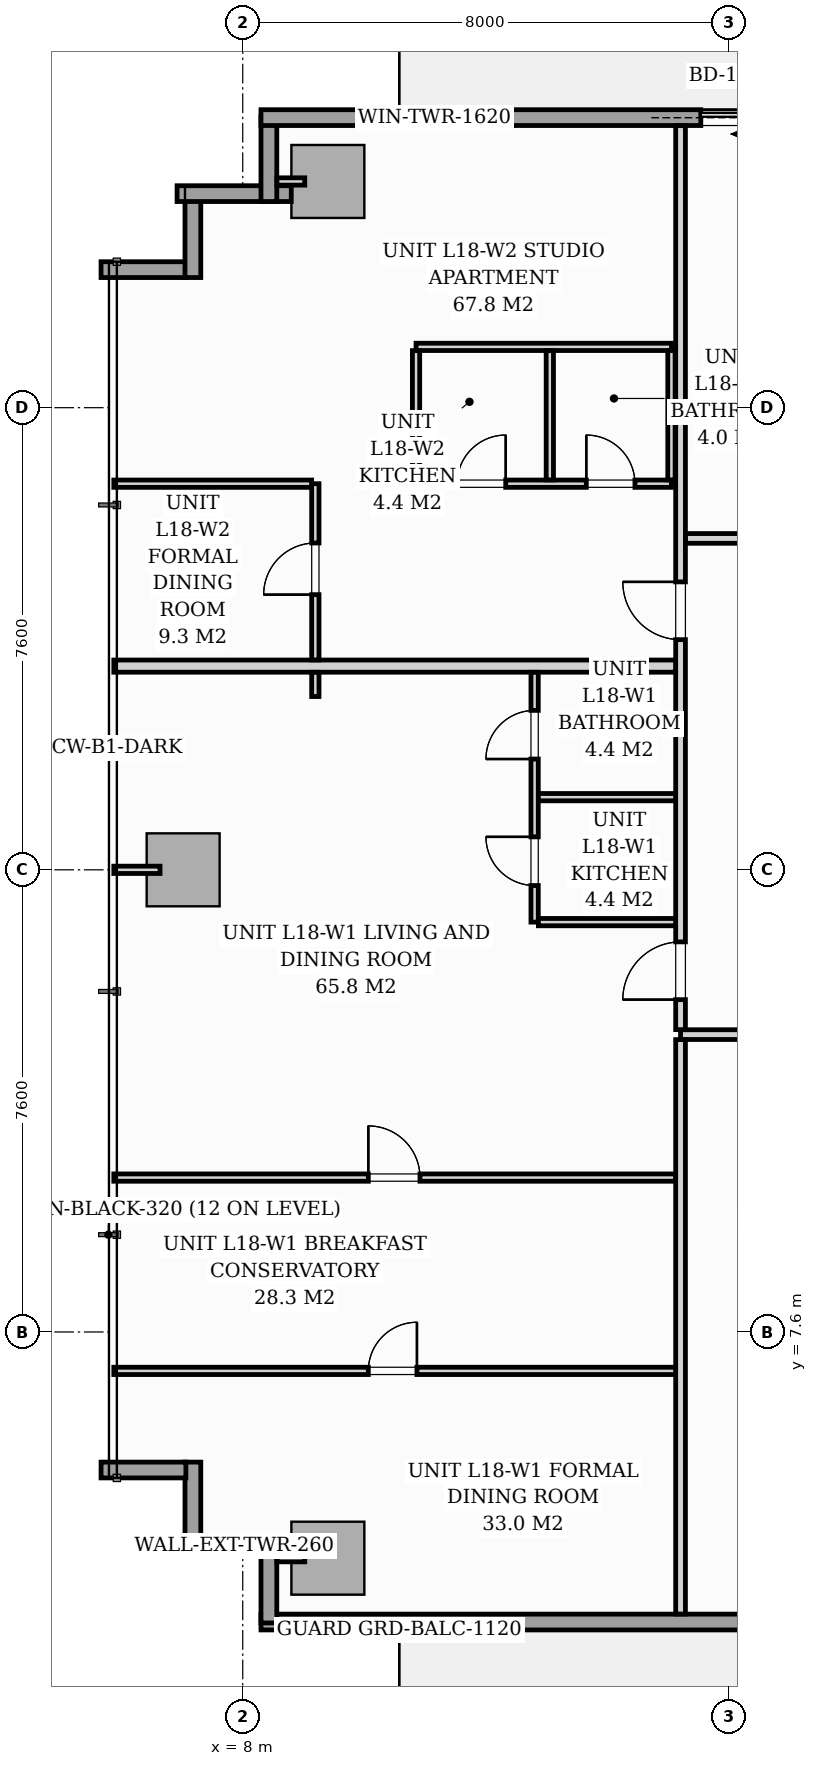
"""IFC4 building model, lengths in metres.
Left out: names, types, materials, properties, quantities, classifications, styles, units other than length and angle.
Written with IfcOpenShell. Run it as: python <this file> out.ifc"""

import sys

from ifc_helpers import new_model, si_unit, direction, frame, frame_2d, origin, origin_2d, place, context, subcontext, project, spatial, rectangle, extrude, source, transform, mapped, element, fill, save


model = new_model("IFC4")
c1 = context("Model", 3, precision=1e-05, world=origin(), true_north=direction((0.0, 1.0)))
c2 = subcontext(c1, "Body", "Model", "MODEL_VIEW")
j1 = project(units=[si_unit("LENGTHUNIT", "METRE"), si_unit("PLANEANGLEUNIT", "RADIAN")], contexts=[c1])
p1 = place(None, origin())
s1 = spatial("IfcSite", under=j1, at=p1, CompositionType="ELEMENT")
p2 = place(p1, origin())
s2 = spatial("IfcBuilding", under=s1, at=p2, CompositionType="ELEMENT")
p3 = place(p2, frame((0.0, 0.0, 64.6)))
s3 = spatial("IfcBuildingStorey", under=s2, at=p3, CompositionType="ELEMENT", Elevation=64.6)
m1 = source(origin(), c2, "Body", "SweptSolid", [
    extrude(rectangle(XDim=1.2, YDim=1.2, at=origin_2d()), origin(), (0.0, 0.0, 1.0), 3.194),
])
for number, where, z_axis, x_axis in (
    (1, (9.4, 3.88, 0.002), (0.0, 0.0, 1.0), (1.0, 0.0, 0.0)),
    (2, (9.4, 26.52, 0.002), (0.0, 0.0, 1.0), (1.0, 0.0, 0.0)),
    (3, (7.02, 15.2, 0.002), (0.0, 0.0, 1.0), (1.0, 0.0, 0.0)),
):
    element("IfcColumn", number, at=place(p3, frame(where, z_axis=z_axis, x_axis=x_axis)), inside=s3, PredefinedType="COLUMN", context=c2, shape_type="MappedRepresentation", body=[
        mapped(m1, transform((0.0, 0.0, 0.0), scale=1.0)),
    ])
p4 = place(p3, frame((8.798, 4.08, 0.0), z_axis=(0.0, 0.0, 1.0), x_axis=(-1.0, 0.0, 0.0)))
e4 = element("IfcWall", 4, at=p4, inside=s3, PredefinedType="STANDARD", context=c2, shape_type="SweptSolid", body=[
    extrude(rectangle(XDim=1.878, YDim=0.26, at=frame_2d((0.939, 0.0))), origin(), (0.0, 0.0, 1.0), 2.9),
])
for number, where, z_axis, x_axis in (
    (5, (7.18, 4.065, 0.0), (0.0, 0.0, 1.0), (0.0, 1.0, 0.0)),
    (6, (7.065, 5.33, 0.0), (0.0, 0.0, 1.0), (-1.0, 0.0, 0.0)),
    (7, (5.67, 25.07, 0.0), (0.0, 0.0, 1.0), (1.0, 0.0, 0.0)),
    (8, (7.18, 24.94, 0.0), (0.0, 0.0, 1.0), (0.0, 1.0, 0.0)),
):
    element("IfcWall", number, at=place(p3, frame(where, z_axis=z_axis, x_axis=x_axis)), inside=s3, PredefinedType="STANDARD", context=c2, shape_type="SweptSolid", body=[
        extrude(rectangle(XDim=1.395, YDim=0.26, at=frame_2d((0.698, 0.0))), origin(), (0.0, 0.0, 1.0), 2.9),
    ])
p5 = place(p3, frame((6.92, 26.32, 0.0), z_axis=(0.0, 0.0, 1.0), x_axis=(1.0, 0.0, 0.0)))
e9 = element("IfcWall", 9, at=p5, inside=s3, PredefinedType="STANDARD", context=c2, shape_type="SweptSolid", body=[
    extrude(rectangle(XDim=1.878, YDim=0.26, at=frame_2d((0.939, 0.0))), origin(), (0.0, 0.0, 1.0), 2.9),
])
p6 = place(p3, frame((8.43, 26.19, 0.0), z_axis=(0.0, 0.0, 1.0), x_axis=(0.0, 1.0, 0.0)))
e10 = element("IfcWall", 10, at=p6, inside=s3, PredefinedType="STANDARD", context=c2, shape_type="SweptSolid", body=[
    extrude(rectangle(XDim=1.395, YDim=0.26, at=frame_2d((0.698, 0.0))), origin(), (0.0, 0.0, 1.0), 2.9),
])
p7 = place(p3, frame((8.3, 27.57, 0.0), z_axis=(0.0, 0.0, 1.0), x_axis=(1.0, 0.0, 0.0)))
e11 = element("IfcWall", 11, at=p7, inside=s3, PredefinedType="STANDARD", context=c2, shape_type="SweptSolid", body=[
    extrude(rectangle(XDim=17.15, YDim=0.26, at=frame_2d((8.575, 0.0))), origin(), (0.0, 0.0, 1.0), 2.9),
])
p8 = place(p7, frame((7.233, 0.0, 0.0)))
e12 = element("IfcOpeningElement", 12, at=p8, cuts=e11, PredefinedType="OPENING", context=c2, shape_type="SweptSolid", body=[
    extrude(rectangle(XDim=1.8, YDim=2.06, at=frame_2d((0.9, 1.03))), frame((0.0, 0.14, 0.0), z_axis=(0.0, -1.0, 0.0), x_axis=(1.0, 0.0, 0.0)), (0.0, 0.0, 1.0), 0.28),
])
p9 = place(p7, frame((2.05, 0.0, 0.65)))
e13 = element("IfcOpeningElement", 13, at=p9, cuts=e11, PredefinedType="OPENING", context=c2, shape_type="SweptSolid", body=[
    extrude(rectangle(XDim=1.6, YDim=1.5, at=frame_2d((0.8, 0.75))), frame((0.0, 0.14, 0.0), z_axis=(0.0, -1.0, 0.0), x_axis=(1.0, 0.0, 0.0)), (0.0, 0.0, 1.0), 0.28),
])
p10 = place(p3, frame((25.45, 2.83, 0.0), z_axis=(0.0, 0.0, 1.0), x_axis=(-1.0, 0.0, 0.0)))
e14 = element("IfcWall", 14, at=p10, inside=s3, PredefinedType="STANDARD", context=c2, shape_type="SweptSolid", body=[
    extrude(rectangle(XDim=17.15, YDim=0.26, at=frame_2d((8.575, 0.0))), origin(), (0.0, 0.0, 1.0), 2.9),
])
p11 = place(p10, frame((6.65, 0.0, 0.0)))
e15 = element("IfcOpeningElement", 15, at=p11, cuts=e14, PredefinedType="OPENING", context=c2, shape_type="SweptSolid", body=[
    extrude(rectangle(XDim=1.8, YDim=2.06, at=frame_2d((0.9, 1.03))), frame((0.0, 0.14, 0.0), z_axis=(0.0, -1.0, 0.0), x_axis=(1.0, 0.0, 0.0)), (0.0, 0.0, 1.0), 0.28),
])
p12 = place(p10, frame((0.7, 0.0, 0.65)))
e16 = element("IfcOpeningElement", 16, at=p12, cuts=e14, PredefinedType="OPENING", context=c2, shape_type="SweptSolid", body=[
    extrude(rectangle(XDim=1.6, YDim=1.5, at=frame_2d((0.8, 0.75))), frame((0.0, 0.14, 0.0), z_axis=(0.0, -1.0, 0.0), x_axis=(1.0, 0.0, 0.0)), (0.0, 0.0, 1.0), 0.28),
])
p13 = place(p3, frame((8.43, 2.815, 0.0), z_axis=(0.0, 0.0, 1.0), x_axis=(0.0, 1.0, 0.0)))
e17 = element("IfcWall", 17, at=p13, inside=s3, PredefinedType="STANDARD", context=c2, shape_type="SweptSolid", body=[
    extrude(rectangle(XDim=1.395, YDim=0.26, at=frame_2d((0.698, 0.0))), origin(), (0.0, 0.0, 1.0), 2.9),
])
p14 = place(p3, frame((15.2, 12.49, 0.0), z_axis=(0.0, 0.0, 1.0), x_axis=(1.0, 0.0, 0.0)))
e18 = element("IfcWall", 18, at=p14, inside=s3, PredefinedType="PARTITIONING", context=c2, shape_type="SweptSolid", body=[
    extrude(rectangle(XDim=37.1, YDim=0.16, at=frame_2d((18.55, 0.0))), origin(), (0.0, 0.0, 1.0), 2.9),
])
p15 = place(p14, frame((5.863, 0.0, 0.0)))
e19 = element("IfcOpeningElement", 19, at=p15, cuts=e18, PredefinedType="OPENING", context=c2, shape_type="SweptSolid", body=[
    extrude(rectangle(XDim=0.95, YDim=2.06, at=frame_2d((0.475, 1.03))), frame((0.0, 0.09, 0.0), z_axis=(0.0, -1.0, 0.0), x_axis=(1.0, 0.0, 0.0)), (0.0, 0.0, 1.0), 0.18),
])
p16 = place(p14, frame((18.25, 0.0, 0.0)))
e20 = element("IfcOpeningElement", 20, at=p16, cuts=e18, PredefinedType="OPENING", context=c2, shape_type="SweptSolid", body=[
    extrude(rectangle(XDim=0.95, YDim=2.06, at=frame_2d((0.475, 1.03))), frame((0.0, 0.09, 0.0), z_axis=(0.0, -1.0, 0.0), x_axis=(1.0, 0.0, 0.0)), (0.0, 0.0, 1.0), 0.18),
])
p17 = place(p14, frame((30.63, 0.0, 0.0)))
e21 = element("IfcOpeningElement", 21, at=p17, cuts=e18, PredefinedType="OPENING", context=c2, shape_type="SweptSolid", body=[
    extrude(rectangle(XDim=0.95, YDim=2.06, at=frame_2d((0.475, 1.03))), frame((0.0, 0.09, 0.0), z_axis=(0.0, -1.0, 0.0), x_axis=(1.0, 0.0, 0.0)), (0.0, 0.0, 1.0), 0.18),
])
p18 = place(p3, frame((15.2, 2.962, 0.0), z_axis=(0.0, 0.0, 1.0), x_axis=(0.0, 1.0, 0.0)))
e22 = element("IfcWall", 22, at=p18, inside=s3, PredefinedType="PARTITIONING", context=c2, shape_type="SweptSolid", body=[
    extrude(rectangle(XDim=9.446, YDim=0.16, at=frame_2d((4.723, 0.0))), origin(), (0.0, 0.0, 1.0), 2.9),
])
p19 = place(p3, frame((15.2, 12.572, 0.0), z_axis=(0.0, 0.0, 1.0), x_axis=(0.0, 1.0, 0.0)))
e23 = element("IfcWall", 23, at=p19, inside=s3, PredefinedType="PARTITIONING", context=c2, shape_type="SweptSolid", body=[
    extrude(rectangle(XDim=14.866, YDim=0.16, at=frame_2d((7.433, 0.0))), origin(), (0.0, 0.0, 1.0), 2.9),
])
p20 = place(p19, frame((0.493, 0.0, 0.0)))
e24 = element("IfcOpeningElement", 24, at=p20, cuts=e23, PredefinedType="OPENING", context=c2, shape_type="SweptSolid", body=[
    extrude(rectangle(XDim=0.95, YDim=2.06, at=frame_2d((0.475, 1.03))), frame((0.0, 0.09, 0.0), z_axis=(0.0, -1.0, 0.0), x_axis=(1.0, 0.0, 0.0)), (0.0, 0.0, 1.0), 0.18),
])
p21 = place(p19, frame((6.413, 0.0, 0.0)))
e25 = element("IfcOpeningElement", 25, at=p21, cuts=e23, PredefinedType="OPENING", context=c2, shape_type="SweptSolid", body=[
    extrude(rectangle(XDim=0.95, YDim=2.06, at=frame_2d((0.475, 1.03))), frame((0.0, 0.09, 0.0), z_axis=(0.0, -1.0, 0.0), x_axis=(1.0, 0.0, 0.0)), (0.0, 0.0, 1.0), 0.18),
])
p22 = place(p3, frame((5.88, 18.55, 0.0), z_axis=(0.0, 0.0, 1.0), x_axis=(1.0, 0.0, 0.0)))
e26 = element("IfcWall", 26, at=p22, inside=s3, PredefinedType="PARTITIONING", context=c2, shape_type="SweptSolid", body=[
    extrude(rectangle(XDim=9.238, YDim=0.2, at=frame_2d((4.619, 0.0))), origin(), (0.0, 0.0, 1.0), 2.9),
])
p23 = place(p3, frame((12.8, 14.34, 0.0), z_axis=(0.0, 0.0, 1.0), x_axis=(0.0, 1.0, 0.0)))
e27 = element("IfcWall", 27, at=p23, inside=s3, PredefinedType="PARTITIONING", context=c2, shape_type="SweptSolid", body=[
    extrude(rectangle(XDim=4.108, YDim=0.12, at=frame_2d((2.054, 0.0))), origin(), (0.0, 0.0, 1.0), 2.9),
])
p24 = place(p23, frame((0.602, 0.0, 0.0)))
e28 = element("IfcOpeningElement", 28, at=p24, cuts=e27, PredefinedType="OPENING", context=c2, shape_type="SweptSolid", body=[
    extrude(rectangle(XDim=0.8, YDim=2.0, at=frame_2d((0.4, 1.0))), frame((0.0, 0.07, 0.0), z_axis=(0.0, -1.0, 0.0), x_axis=(1.0, 0.0, 0.0)), (0.0, 0.0, 1.0), 0.14),
])
p25 = place(p23, frame((2.682, 0.0, 0.0)))
e29 = element("IfcOpeningElement", 29, at=p25, cuts=e27, PredefinedType="OPENING", context=c2, shape_type="SweptSolid", body=[
    extrude(rectangle(XDim=0.8, YDim=2.0, at=frame_2d((0.4, 1.0))), frame((0.0, 0.07, 0.0), z_axis=(0.0, -1.0, 0.0), x_axis=(1.0, 0.0, 0.0)), (0.0, 0.0, 1.0), 0.14),
])
for number, where, z_axis, x_axis in (
    (30, (12.862, 16.395, 0.0), (0.0, 0.0, 1.0), (1.0, 0.0, 0.0)),
    (31, (12.862, 14.34, 0.0), (0.0, 0.0, 1.0), (1.0, 0.0, 0.0)),
):
    element("IfcWall", number, at=place(p3, frame(where, z_axis=z_axis, x_axis=x_axis)), inside=s3, PredefinedType="PARTITIONING", context=c2, shape_type="SweptSolid", body=[
        extrude(rectangle(XDim=2.256, YDim=0.12, at=frame_2d((1.128, 0.0))), origin(), (0.0, 0.0, 1.0), 2.9),
    ])
p26 = place(p3, frame((5.88, 6.96, 0.0), z_axis=(0.0, 0.0, 1.0), x_axis=(1.0, 0.0, 0.0)))
e32 = element("IfcWall", 32, at=p26, inside=s3, PredefinedType="PARTITIONING", context=c2, shape_type="SweptSolid", body=[
    extrude(rectangle(XDim=9.238, YDim=0.12, at=frame_2d((4.619, 0.0))), origin(), (0.0, 0.0, 1.0), 2.9),
])
p27 = place(p26, frame((4.185, 0.0, 0.0)))
e33 = element("IfcOpeningElement", 33, at=p27, cuts=e32, PredefinedType="OPENING", context=c2, shape_type="SweptSolid", body=[
    extrude(rectangle(XDim=0.8, YDim=2.0, at=frame_2d((0.4, 1.0))), frame((0.0, 0.07, 0.0), z_axis=(0.0, -1.0, 0.0), x_axis=(1.0, 0.0, 0.0)), (0.0, 0.0, 1.0), 0.14),
])
p28 = place(p3, frame((5.88, 10.139, 0.0), z_axis=(0.0, 0.0, 1.0), x_axis=(1.0, 0.0, 0.0)))
e34 = element("IfcWall", 34, at=p28, inside=s3, PredefinedType="PARTITIONING", context=c2, shape_type="SweptSolid", body=[
    extrude(rectangle(XDim=9.238, YDim=0.12, at=frame_2d((4.619, 0.0))), origin(), (0.0, 0.0, 1.0), 2.9),
])
p29 = place(p28, frame((4.185, 0.0, 0.0)))
e35 = element("IfcOpeningElement", 35, at=p29, cuts=e34, PredefinedType="OPENING", context=c2, shape_type="SweptSolid", body=[
    extrude(rectangle(XDim=0.85, YDim=2.05, at=frame_2d((0.425, 1.025))), frame((0.0, 0.07, 0.0), z_axis=(0.0, -1.0, 0.0), x_axis=(1.0, 0.0, 0.0)), (0.0, 0.0, 1.0), 0.14),
])
p30 = place(p3, frame((10.85, 21.55, 0.0), z_axis=(0.0, 0.0, 1.0), x_axis=(1.0, 0.0, 0.0)))
e36 = element("IfcWall", 36, at=p30, inside=s3, PredefinedType="PARTITIONING", context=c2, shape_type="SweptSolid", body=[
    extrude(rectangle(XDim=4.2, YDim=0.12, at=frame_2d((2.1, 0.0))), origin(), (0.0, 0.0, 1.0), 2.9),
])
p31 = place(p30, frame((0.675, 0.0, 0.0)))
e37 = element("IfcOpeningElement", 37, at=p31, cuts=e36, PredefinedType="OPENING", context=c2, shape_type="SweptSolid", body=[
    extrude(rectangle(XDim=0.8, YDim=2.0, at=frame_2d((0.4, 1.0))), frame((0.0, 0.07, 0.0), z_axis=(0.0, -1.0, 0.0), x_axis=(1.0, 0.0, 0.0)), (0.0, 0.0, 1.0), 0.14),
])
p32 = place(p30, frame((2.8, 0.0, 0.0)))
e38 = element("IfcOpeningElement", 38, at=p32, cuts=e36, PredefinedType="OPENING", context=c2, shape_type="SweptSolid", body=[
    extrude(rectangle(XDim=0.8, YDim=2.02, at=frame_2d((0.4, 1.01))), frame((0.0, 0.07, 0.0), z_axis=(0.0, -1.0, 0.0), x_axis=(1.0, 0.0, 0.0)), (0.0, 0.0, 1.0), 0.14),
])
p33 = place(p3, frame((10.85, 23.8, 0.0), z_axis=(0.0, 0.0, 1.0), x_axis=(1.0, 0.0, 0.0)))
e39 = element("IfcWall", 39, at=p33, inside=s3, PredefinedType="PARTITIONING", context=c2, shape_type="SweptSolid", body=[
    extrude(rectangle(XDim=4.2, YDim=0.12, at=frame_2d((2.1, 0.0))), origin(), (0.0, 0.0, 1.0), 2.9),
])
for number, where, z_axis, x_axis in (
    (40, (10.85, 21.612, 0.0), (0.0, 0.0, 1.0), (0.0, 1.0, 0.0)),
    (41, (13.05, 21.612, 0.0), (0.0, 0.0, 1.0), (0.0, 1.0, 0.0)),
    (42, (15.05, 21.612, 0.0), (0.0, 0.0, 1.0), (0.0, 1.0, 0.0)),
):
    element("IfcWall", number, at=place(p3, frame(where, z_axis=z_axis, x_axis=x_axis)), inside=s3, PredefinedType="PARTITIONING", context=c2, shape_type="SweptSolid", body=[
        extrude(rectangle(XDim=2.126, YDim=0.12, at=frame_2d((1.063, 0.0))), origin(), (0.0, 0.0, 1.0), 2.9),
    ])
p34 = place(p3, frame((9.194, 18.05, 0.0), z_axis=(0.0, 0.0, 1.0), x_axis=(0.0, 1.0, 0.0)))
e43 = element("IfcWall", 43, at=p34, inside=s3, PredefinedType="PARTITIONING", context=c2, shape_type="SweptSolid", body=[
    extrude(rectangle(XDim=0.398, YDim=0.12, at=frame_2d((0.199, 0.0))), origin(), (0.0, 0.0, 1.0), 2.9),
])
p35 = place(p3, frame((9.194, 18.652, 0.0), z_axis=(0.0, 0.0, 1.0), x_axis=(0.0, 1.0, 0.0)))
e44 = element("IfcWall", 44, at=p35, inside=s3, PredefinedType="PARTITIONING", context=c2, shape_type="SweptSolid", body=[
    extrude(rectangle(XDim=2.898, YDim=0.12, at=frame_2d((1.449, 0.0))), origin(), (0.0, 0.0, 1.0), 2.9),
])
p36 = place(p35, frame((1.073, 0.0, 0.0)))
e45 = element("IfcOpeningElement", 45, at=p36, cuts=e44, PredefinedType="OPENING", context=c2, shape_type="SweptSolid", body=[
    extrude(rectangle(XDim=0.85, YDim=2.05, at=frame_2d((0.425, 1.025))), frame((0.0, 0.07, 0.0), z_axis=(0.0, -1.0, 0.0), x_axis=(1.0, 0.0, 0.0)), (0.0, 0.0, 1.0), 0.14),
])
p37 = place(p3, frame((5.88, 21.55, 0.0), z_axis=(0.0, 0.0, 1.0), x_axis=(1.0, 0.0, 0.0)))
e46 = element("IfcWall", 46, at=p37, inside=s3, PredefinedType="PARTITIONING", context=c2, shape_type="SweptSolid", body=[
    extrude(rectangle(XDim=3.252, YDim=0.12, at=frame_2d((1.626, 0.0))), origin(), (0.0, 0.0, 1.0), 2.9),
])
p38 = place(p3, frame((15.282, 20.65, 0.0), z_axis=(0.0, 0.0, 1.0), x_axis=(1.0, 0.0, 0.0)))
e47 = element("IfcWall", 47, at=p38, inside=s3, PredefinedType="PARTITIONING", context=c2, shape_type="SweptSolid", body=[
    extrude(rectangle(XDim=1.786, YDim=0.16, at=frame_2d((0.893, 0.0))), origin(), (0.0, 0.0, 1.0), 2.9),
])
for number, where, z_axis, x_axis in (
    (48, (9.02, 3.88, 0.0), (0.0, 0.0, 1.0), (-1.0, 0.0, 0.0)),
    (49, (9.02, 26.52, 0.0), (0.0, 0.0, 1.0), (-1.0, 0.0, 0.0)),
):
    element("IfcWall", number, at=place(p3, frame(where, z_axis=z_axis, x_axis=x_axis)), inside=s3, PredefinedType="PARTITIONING", context=c2, shape_type="SweptSolid", body=[
        extrude(rectangle(XDim=0.458, YDim=0.12, at=frame_2d((0.229, 0.0))), origin(), (0.0, 0.0, 1.0), 2.9),
    ])
p39 = place(p3, frame((6.64, 15.2, 0.0), z_axis=(0.0, 0.0, 1.0), x_axis=(-1.0, 0.0, 0.0)))
e50 = element("IfcWall", 50, at=p39, inside=s3, PredefinedType="PARTITIONING", context=c2, shape_type="SweptSolid", body=[
    extrude(rectangle(XDim=0.76, YDim=0.12, at=frame_2d((0.38, 0.0))), origin(), (0.0, 0.0, 1.0), 2.9),
])
m2 = source(origin(), c2, "Body", "SweptSolid", [
    extrude(rectangle(XDim=1.8, YDim=2.06, at=frame_2d((0.9, 1.03))), frame((0.0, 0.025, 0.0), z_axis=(0.0, -1.0, 0.0), x_axis=(1.0, 0.0, 0.0)), (0.0, 0.0, 1.0), 0.05),
])
p40 = place(p8, origin())
e51 = element("IfcDoor", 51, at=p40, inside=s3, OperationType="SLIDING_TO_LEFT", PredefinedType="DOOR", context=c2, shape_type="MappedRepresentation", body=[
    mapped(m2, transform((0.0, 0.0, 0.0), scale=1.0)),
])
fill(e12, e51)
m3 = source(origin(), c2, "Body", "SweptSolid", [
    extrude(rectangle(XDim=1.6, YDim=1.5, at=frame_2d((0.8, 0.75))), frame((0.0, 0.03, 0.0), z_axis=(0.0, -1.0, 0.0), x_axis=(1.0, 0.0, 0.0)), (0.0, 0.0, 1.0), 0.06),
])
p41 = place(p9, origin())
e52 = element("IfcWindow", 52, at=p41, inside=s3, PartitioningType="SINGLE_PANEL", PredefinedType="WINDOW", context=c2, shape_type="MappedRepresentation", body=[
    mapped(m3, transform((0.0, 0.0, 0.0), scale=1.0)),
])
fill(e13, e52)
m4 = source(origin(), c2, "Body", "SweptSolid", [
    extrude(rectangle(XDim=0.95, YDim=2.06, at=frame_2d((0.475, 1.03))), frame((0.0, 0.025, 0.0), z_axis=(0.0, -1.0, 0.0), x_axis=(1.0, 0.0, 0.0)), (0.0, 0.0, 1.0), 0.05),
])
p42 = place(p20, origin())
e53 = element("IfcDoor", 53, at=p42, inside=s3, OperationType="SINGLE_SWING_LEFT", PredefinedType="DOOR", context=c2, shape_type="MappedRepresentation", body=[
    mapped(m4, transform((0.0, 0.0, 0.0), scale=1.0)),
])
fill(e24, e53)
m5 = source(origin(), c2, "Body", "SweptSolid", [
    extrude(rectangle(XDim=0.8, YDim=2.0, at=frame_2d((0.4, 1.0))), frame((0.0, 0.025, 0.0), z_axis=(0.0, -1.0, 0.0), x_axis=(1.0, 0.0, 0.0)), (0.0, 0.0, 1.0), 0.05),
])
p43 = place(p24, origin())
e54 = element("IfcDoor", 54, at=p43, inside=s3, OperationType="SINGLE_SWING_RIGHT", PredefinedType="DOOR", context=c2, shape_type="MappedRepresentation", body=[
    mapped(m5, transform((0.0, 0.0, 0.0), scale=1.0)),
])
fill(e28, e54)
p44 = place(p25, origin())
e55 = element("IfcDoor", 55, at=p44, inside=s3, OperationType="SINGLE_SWING_LEFT", PredefinedType="DOOR", context=c2, shape_type="MappedRepresentation", body=[
    mapped(m5, transform((0.0, 0.0, 0.0), scale=1.0)),
])
fill(e29, e55)
p45 = place(p27, origin())
e56 = element("IfcDoor", 56, at=p45, inside=s3, OperationType="SINGLE_SWING_RIGHT", PredefinedType="DOOR", context=c2, shape_type="MappedRepresentation", body=[
    mapped(m5, transform((0.0, 0.0, 0.0), scale=1.0)),
])
fill(e33, e56)
m6 = source(origin(), c2, "Body", "SweptSolid", [
    extrude(rectangle(XDim=0.85, YDim=2.05, at=frame_2d((0.425, 1.025))), frame((0.0, 0.025, 0.0), z_axis=(0.0, -1.0, 0.0), x_axis=(1.0, 0.0, 0.0)), (0.0, 0.0, 1.0), 0.05),
])
p46 = place(p29, origin())
e57 = element("IfcDoor", 57, at=p46, inside=s3, OperationType="SINGLE_SWING_LEFT", PredefinedType="DOOR", context=c2, shape_type="MappedRepresentation", body=[
    mapped(m6, transform((0.0, 0.0, 0.0), scale=1.0)),
])
fill(e35, e57)
p47 = place(p21, origin())
e58 = element("IfcDoor", 58, at=p47, inside=s3, OperationType="SINGLE_SWING_RIGHT", PredefinedType="DOOR", context=c2, shape_type="MappedRepresentation", body=[
    mapped(m4, transform((0.0, 0.0, 0.0), scale=1.0)),
])
fill(e25, e58)
p48 = place(p36, origin())
e59 = element("IfcDoor", 59, at=p48, inside=s3, OperationType="SINGLE_SWING_LEFT", PredefinedType="DOOR", context=c2, shape_type="MappedRepresentation", body=[
    mapped(m6, transform((0.0, 0.0, 0.0), scale=1.0)),
])
fill(e45, e59)
p49 = place(p31, origin())
e60 = element("IfcDoor", 60, at=p49, inside=s3, OperationType="SINGLE_SWING_RIGHT", PredefinedType="DOOR", context=c2, shape_type="MappedRepresentation", body=[
    mapped(m5, transform((0.0, 0.0, 0.0), scale=1.0)),
])
fill(e37, e60)
m7 = source(origin(), c2, "Body", "SweptSolid", [
    extrude(rectangle(XDim=0.8, YDim=2.02, at=frame_2d((0.4, 1.01))), frame((0.0, 0.025, 0.0), z_axis=(0.0, -1.0, 0.0), x_axis=(1.0, 0.0, 0.0)), (0.0, 0.0, 1.0), 0.05),
])
p50 = place(p32, origin())
e61 = element("IfcDoor", 61, at=p50, inside=s3, OperationType="SINGLE_SWING_LEFT", PredefinedType="DOOR", context=c2, shape_type="MappedRepresentation", body=[
    mapped(m7, transform((0.0, 0.0, 0.0), scale=1.0)),
])
fill(e38, e61)
save(model, sys.argv[1])
